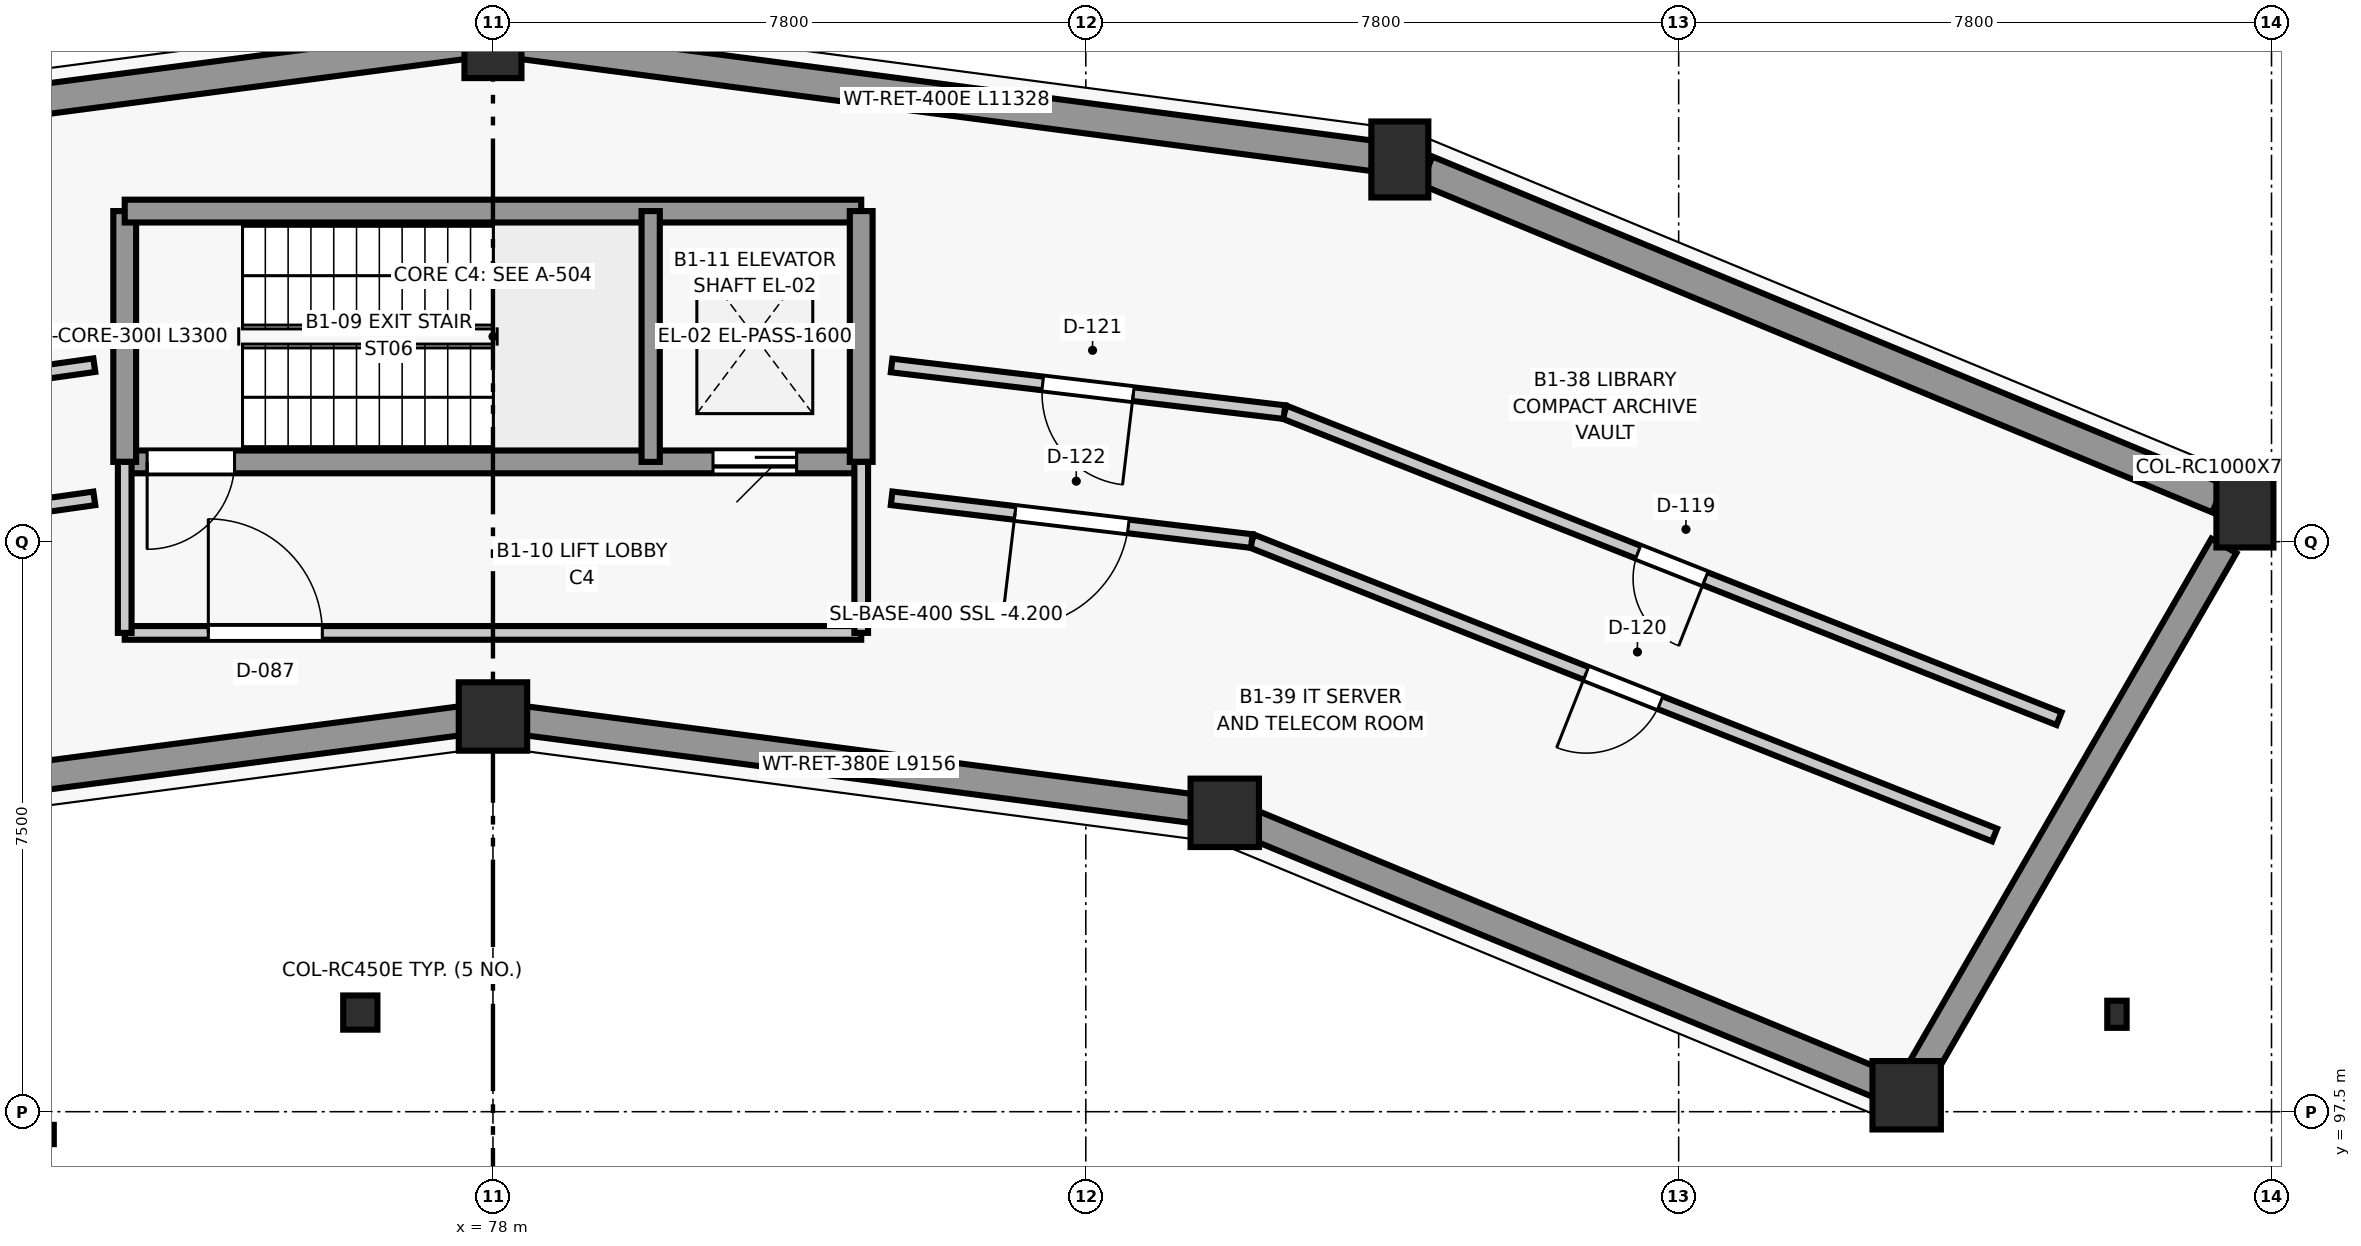
"""IFC4 building model, lengths in metres.
Left out: names, types, materials, properties, quantities, classifications, styles, units other than length and angle.
Written with IfcOpenShell. Run it as: python <this file> out.ifc"""

import sys

from ifc_helpers import new_model, si_unit, direction, frame, frame_2d, origin, origin_2d, place, context, subcontext, project, spatial, rectangle, hollow_rectangle, circle, i_section, extrude, element, fill, save


model = new_model("IFC4")
c1 = context("Model", 3, precision=1e-05, world=origin(), true_north=direction((0.0, 1.0)))
c2 = subcontext(c1, "Body", "Model", "MODEL_VIEW")
j1 = project(units=[si_unit("LENGTHUNIT", "METRE"), si_unit("PLANEANGLEUNIT", "RADIAN")], contexts=[c1])
p1 = place(None, origin())
s1 = spatial("IfcSite", under=j1, at=p1, CompositionType="ELEMENT")
p2 = place(p1, origin())
s2 = spatial("IfcBuilding", under=s1, at=p2, CompositionType="ELEMENT")
p3 = place(p2, frame((0.0, 0.0, -4.2)))
s3 = spatial("IfcBuildingStorey", under=s2, at=p3, CompositionType="ELEMENT", Elevation=-4.2)
for number, where, z_axis, x_axis in (
    (1, (96.6, 97.716, 0.0), (0.0, 0.0, 1.0), (1.0, 0.0, 0.0)),
    (2, (87.628, 101.432, 0.0), (0.0, 0.0, 1.0), (1.0, 0.0, 0.0)),
    (3, (78.0, 102.7, 0.0), (0.0, 0.0, 1.0), (1.0, 0.0, 0.0)),
):
    element("IfcColumn", number, at=place(p3, frame(where, z_axis=z_axis, x_axis=x_axis)), inside=s3, PredefinedType="COLUMN", context=c2, shape_type="SweptSolid", body=[
        extrude(circle(Radius=0.45, at=origin_2d()), origin(), (0.0, 0.0, 1.0), 4.2),
    ])
for number, where, z_axis, x_axis in (
    (4, (101.05, 105.424, 0.0), (0.0, 0.0, 1.0), (1.0, 0.0, 0.0)),
    (5, (89.932, 110.029, 0.0), (0.0, 0.0, 1.0), (1.0, 0.0, 0.0)),
    (6, (78.0, 111.6, 0.0), (0.0, 0.0, 1.0), (1.0, 0.0, 0.0)),
):
    element("IfcColumn", number, at=place(p3, frame(where, z_axis=z_axis, x_axis=x_axis)), inside=s3, PredefinedType="COLUMN", context=c2, shape_type="SweptSolid", body=[
        extrude(rectangle(XDim=0.75, YDim=1.0, at=origin_2d()), origin(), (0.0, 0.0, 1.0), 4.2),
    ])
p4 = place(p3, frame((99.366, 98.782, 0.0), z_axis=(0.0, 0.0, 1.0), x_axis=(1.0, 0.0, 0.0)))
e7 = element("IfcColumn", 7, at=p4, inside=s3, PredefinedType="COLUMN", context=c2, shape_type="SweptSolid", body=[
    extrude(i_section(OverallWidth=0.255, OverallDepth=0.357, WebThickness=0.01, FlangeThickness=0.018, FilletRadius=0.015, at=origin_2d()), origin(), (0.0, 0.0, 1.0), 4.2),
])
p5 = place(p3, frame((76.255, 98.804, 0.0), z_axis=(0.0, 0.0, 1.0), x_axis=(1.0, 0.0, 0.0)))
e8 = element("IfcColumn", 8, at=p5, inside=s3, PredefinedType="COLUMN", context=c2, shape_type="SweptSolid", body=[
    extrude(rectangle(XDim=0.45, YDim=0.45, at=origin_2d()), origin(), (0.0, 0.0, 1.0), 4.2),
])
p6 = place(p3, frame((90.283, 109.883, 0.0), z_axis=(0.0, 0.0, 1.0), x_axis=(0.923883530636, -0.382673779896, 0.0)))
e9 = element("IfcWall", 9, at=p6, inside=s3, PredefinedType="SHEAR", context=c2, shape_type="SweptSolid", body=[
    extrude(rectangle(XDim=11.272, YDim=0.4, at=frame_2d((5.636, 0.0))), origin(), (0.0, 0.0, 1.0), 3.92),
])
p7 = place(p3, frame((96.323, 97.831, 0.0), z_axis=(0.0, 0.0, 1.0), x_axis=(-0.923880324771, 0.382681519675, 0.0)))
e10 = element("IfcWall", 10, at=p7, inside=s3, PredefinedType="SHEAR", context=c2, shape_type="SweptSolid", body=[
    extrude(rectangle(XDim=9.112, YDim=0.38, at=frame_2d((4.556, 0.0))), origin(), (0.0, 0.0, 1.0), 3.92),
])
p8 = place(p3, frame((78.35, 111.554, 0.0), z_axis=(0.0, 0.0, 1.0), x_axis=(0.991443215359, -0.130538694334, 0.0)))
e11 = element("IfcWall", 11, at=p8, inside=s3, PredefinedType="SHEAR", context=c2, shape_type="SweptSolid", body=[
    extrude(rectangle(XDim=11.328, YDim=0.4, at=frame_2d((5.664, 0.0))), origin(), (0.0, 0.0, 1.0), 3.92),
])
p9 = place(p3, frame((87.353, 101.469, 0.0), z_axis=(0.0, 0.0, 1.0), x_axis=(-0.991441766434, 0.130549698469, 0.0)))
e12 = element("IfcWall", 12, at=p9, inside=s3, PredefinedType="SHEAR", context=c2, shape_type="SweptSolid", body=[
    extrude(rectangle(XDim=9.156, YDim=0.38, at=frame_2d((4.578, 0.0))), origin(), (0.0, 0.0, 1.0), 3.92),
])
p10 = place(p3, frame((66.419, 110.075, 0.0), z_axis=(0.0, 0.0, 1.0), x_axis=(0.991443215359, 0.130538694334, 0.0)))
e13 = element("IfcWall", 13, at=p10, inside=s3, PredefinedType="SHEAR", context=c2, shape_type="SweptSolid", body=[
    extrude(rectangle(XDim=11.328, YDim=0.4, at=frame_2d((5.664, 0.0))), origin(), (0.0, 0.0, 1.0), 3.92),
])
p11 = place(p3, frame((77.725, 102.664, 0.0), z_axis=(0.0, 0.0, 1.0), x_axis=(-0.991441766434, -0.130549698469, 0.0)))
e14 = element("IfcWall", 14, at=p11, inside=s3, PredefinedType="SHEAR", context=c2, shape_type="SweptSolid", body=[
    extrude(rectangle(XDim=9.156, YDim=0.38, at=frame_2d((4.578, 0.0))), origin(), (0.0, 0.0, 1.0), 3.92),
])
p12 = place(p3, frame((100.774, 104.946, 0.0), z_axis=(0.0, 0.0, 1.0), x_axis=(-0.499969958057, -0.866042747813, 0.0)))
e15 = element("IfcWall", 15, at=p12, inside=s3, PredefinedType="SHEAR", context=c2, shape_type="SweptSolid", body=[
    extrude(rectangle(XDim=8.026, YDim=0.38, at=frame_2d((4.013, 0.0))), origin(), (0.0, 0.0, 1.0), 3.92),
])
p13 = place(p3, frame((82.845, 106.05, 0.0), z_axis=(0.0, 0.0, 1.0), x_axis=(-1.0, 0.0, 0.0)))
e16 = element("IfcWall", 16, at=p13, inside=s3, PredefinedType="SHEAR", context=c2, shape_type="SweptSolid", body=[
    extrude(rectangle(XDim=9.69, YDim=0.3, at=frame_2d((4.845, 0.0))), origin(), (0.0, 0.0, 1.0), 4.2),
])
p14 = place(p13, frame((8.245, 0.0, 0.0)))
e17 = element("IfcOpeningElement", 17, at=p14, cuts=e16, PredefinedType="OPENING", context=c2, shape_type="SweptSolid", body=[
    extrude(rectangle(XDim=1.15, YDim=2.15, at=frame_2d((0.575, 1.075))), frame((0.0, 0.16, 0.0), z_axis=(0.0, -1.0, 0.0), x_axis=(1.0, 0.0, 0.0)), (0.0, 0.0, 1.0), 0.32),
])
p15 = place(p13, frame((0.85, 0.0, 0.0)))
e18 = element("IfcOpeningElement", 18, at=p15, cuts=e16, PredefinedType="OPENING", context=c2, shape_type="SweptSolid", body=[
    extrude(rectangle(XDim=1.1, YDim=2.15, at=frame_2d((0.55, 1.075))), frame((0.0, 0.16, 0.0), z_axis=(0.0, -1.0, 0.0), x_axis=(1.0, 0.0, 0.0)), (0.0, 0.0, 1.0), 0.32),
])
p16 = place(p3, frame((73.155, 106.05, 0.0), z_axis=(0.0, 0.0, 1.0), x_axis=(0.0, 1.0, 0.0)))
e19 = element("IfcWall", 19, at=p16, inside=s3, PredefinedType="SHEAR", context=c2, shape_type="SweptSolid", body=[
    extrude(rectangle(XDim=3.3, YDim=0.3, at=frame_2d((1.65, 0.0))), origin(), (0.0, 0.0, 1.0), 4.2),
])
p17 = place(p3, frame((73.155, 109.35, 0.0), z_axis=(0.0, 0.0, 1.0), x_axis=(1.0, 0.0, 0.0)))
e20 = element("IfcWall", 20, at=p17, inside=s3, PredefinedType="SHEAR", context=c2, shape_type="SweptSolid", body=[
    extrude(rectangle(XDim=9.69, YDim=0.3, at=frame_2d((4.845, 0.0))), origin(), (0.0, 0.0, 1.0), 4.2),
])
p18 = place(p3, frame((82.845, 109.35, 0.0), z_axis=(0.0, 0.0, 1.0), x_axis=(0.0, -1.0, 0.0)))
e21 = element("IfcWall", 21, at=p18, inside=s3, PredefinedType="SHEAR", context=c2, shape_type="SweptSolid", body=[
    extrude(rectangle(XDim=3.3, YDim=0.3, at=frame_2d((1.65, 0.0))), origin(), (0.0, 0.0, 1.0), 4.2),
])
p19 = place(p3, frame((80.075, 106.05, 0.0), z_axis=(0.0, 0.0, 1.0), x_axis=(0.0, 1.0, 0.0)))
e22 = element("IfcWall", 22, at=p19, inside=s3, PredefinedType="SHEAR", context=c2, shape_type="SweptSolid", body=[
    extrude(rectangle(XDim=3.3, YDim=0.24, at=frame_2d((1.65, 0.0))), origin(), (0.0, 0.0, 1.0), 4.2),
])
p20 = place(p3, frame((73.155, 103.8, 0.0), z_axis=(0.0, 0.0, 1.0), x_axis=(1.0, 0.0, 0.0)))
e23 = element("IfcWall", 23, at=p20, inside=s3, PredefinedType="PARTITIONING", context=c2, shape_type="SweptSolid", body=[
    extrude(rectangle(XDim=9.69, YDim=0.18, at=frame_2d((4.845, 0.0))), origin(), (0.0, 0.0, 1.0), 3.915),
])
p21 = place(p20, frame((1.1, 0.0, 0.0)))
e24 = element("IfcOpeningElement", 24, at=p21, cuts=e23, PredefinedType="OPENING", context=c2, shape_type="SweptSolid", body=[
    extrude(rectangle(XDim=1.5, YDim=2.15, at=frame_2d((0.75, 1.075))), frame((0.0, 0.1, 0.0), z_axis=(0.0, -1.0, 0.0), x_axis=(1.0, 0.0, 0.0)), (0.0, 0.0, 1.0), 0.2),
])
for number, where, z_axis, x_axis in (
    (25, (73.155, 106.05, 0.0), (0.0, 0.0, 1.0), (0.0, -1.0, 0.0)),
    (26, (82.845, 106.05, 0.0), (0.0, 0.0, 1.0), (0.0, -1.0, 0.0)),
):
    element("IfcWall", number, at=place(p3, frame(where, z_axis=z_axis, x_axis=x_axis)), inside=s3, PredefinedType="PARTITIONING", context=c2, shape_type="SweptSolid", body=[
        extrude(rectangle(XDim=2.25, YDim=0.18, at=frame_2d((1.125, 0.0))), origin(), (0.0, 0.0, 1.0), 3.915),
    ])
p22 = place(p3, frame((72.095, 97.2, 0.0), z_axis=(0.0, 0.0, 1.0), x_axis=(1.0, 0.0, 0.0)))
e27 = element("IfcColumn", 27, at=p22, inside=s3, PredefinedType="COLUMN", context=c2, shape_type="SweptSolid", body=[
    extrude(hollow_rectangle(XDim=0.254, YDim=0.254, WallThickness=0.012, InnerFilletRadius=0.012, OuterFilletRadius=0.024, at=origin_2d()), origin(), (0.0, 0.0, 1.0), 4.2),
])
p23 = place(p3, frame((98.604, 102.671, 0.0), z_axis=(0.0, 0.0, 1.0), x_axis=(-0.92984059227, 0.367962597238, 0.0)))
e28 = element("IfcWall", 28, at=p23, inside=s3, PredefinedType="PARTITIONING", context=c2, shape_type="SweptSolid", body=[
    extrude(rectangle(XDim=10.961, YDim=0.18, at=frame_2d((5.48, 0.0))), origin(), (0.0, 0.0, 1.0), 3.915),
])
p24 = place(p23, frame((5.006, 0.0, 0.0)))
e29 = element("IfcOpeningElement", 29, at=p24, cuts=e28, PredefinedType="OPENING", context=c2, shape_type="SweptSolid", body=[
    extrude(rectangle(XDim=0.95, YDim=2.1, at=frame_2d((0.475, 1.05))), frame((0.0, 0.1, 0.0), z_axis=(0.0, -1.0, 0.0), x_axis=(1.0, 0.0, 0.0)), (0.0, 0.0, 1.0), 0.2),
])
p25 = place(p3, frame((97.756, 101.141, 0.0), z_axis=(0.0, 0.0, 1.0), x_axis=(-0.92984171937, 0.367959749046, 0.0)))
e30 = element("IfcWall", 30, at=p25, inside=s3, PredefinedType="PARTITIONING", context=c2, shape_type="SweptSolid", body=[
    extrude(rectangle(XDim=10.51, YDim=0.18, at=frame_2d((5.255, 0.0))), origin(), (0.0, 0.0, 1.0), 3.915),
])
p26 = place(p25, frame((4.73, 0.0, 0.0)))
e31 = element("IfcOpeningElement", 31, at=p26, cuts=e30, PredefinedType="OPENING", context=c2, shape_type="SweptSolid", body=[
    extrude(rectangle(XDim=1.05, YDim=2.1, at=frame_2d((0.525, 1.05))), frame((0.0, 0.1, 0.0), z_axis=(0.0, -1.0, 0.0), x_axis=(1.0, 0.0, 0.0)), (0.0, 0.0, 1.0), 0.2),
])
p27 = place(p3, frame((88.413, 106.705, 0.0), z_axis=(0.0, 0.0, 1.0), x_axis=(-0.993019970185, 0.117946338706, 0.0)))
e32 = element("IfcWall", 32, at=p27, inside=s3, PredefinedType="PARTITIONING", context=c2, shape_type="SweptSolid", body=[
    extrude(rectangle(XDim=5.204, YDim=0.18, at=frame_2d((2.602, 0.0))), origin(), (0.0, 0.0, 1.0), 3.915),
])
p28 = place(p27, frame((2.002, 0.0, 0.0)))
e33 = element("IfcOpeningElement", 33, at=p28, cuts=e32, PredefinedType="OPENING", context=c2, shape_type="SweptSolid", body=[
    extrude(rectangle(XDim=1.2, YDim=2.15, at=frame_2d((0.6, 1.075))), frame((0.0, 0.1, 0.0), z_axis=(0.0, -1.0, 0.0), x_axis=(1.0, 0.0, 0.0)), (0.0, 0.0, 1.0), 0.2),
])
p29 = place(p3, frame((87.984, 105.008, 0.0), z_axis=(0.0, 0.0, 1.0), x_axis=(-0.993021837472, 0.117930616486, 0.0)))
e34 = element("IfcWall", 34, at=p29, inside=s3, PredefinedType="PARTITIONING", context=c2, shape_type="SweptSolid", body=[
    extrude(rectangle(XDim=4.772, YDim=0.18, at=frame_2d((2.386, 0.0))), origin(), (0.0, 0.0, 1.0), 3.915),
])
p30 = place(p29, frame((1.636, 0.0, 0.0)))
e35 = element("IfcOpeningElement", 35, at=p30, cuts=e34, PredefinedType="OPENING", context=c2, shape_type="SweptSolid", body=[
    extrude(rectangle(XDim=1.5, YDim=2.15, at=frame_2d((0.75, 1.075))), frame((0.0, 0.1, 0.0), z_axis=(0.0, -1.0, 0.0), x_axis=(1.0, 0.0, 0.0)), (0.0, 0.0, 1.0), 0.2),
])
p31 = place(p3, frame((72.755, 107.323, 0.0), z_axis=(0.0, 0.0, 1.0), x_axis=(-0.990158330555, -0.139951707499, 0.0)))
e36 = element("IfcWall", 36, at=p31, inside=s3, PredefinedType="PARTITIONING", context=c2, shape_type="SweptSolid", body=[
    extrude(rectangle(XDim=6.141, YDim=0.18, at=frame_2d((3.07, 0.0))), origin(), (0.0, 0.0, 1.0), 3.915),
])
p32 = place(p31, frame((2.345, 0.0, 0.0)))
e37 = element("IfcOpeningElement", 37, at=p32, cuts=e36, PredefinedType="OPENING", context=c2, shape_type="SweptSolid", body=[
    extrude(rectangle(XDim=1.45, YDim=2.2, at=frame_2d((0.725, 1.1))), frame((0.0, 0.1, 0.0), z_axis=(0.0, -1.0, 0.0), x_axis=(1.0, 0.0, 0.0)), (0.0, 0.0, 1.0), 0.2),
])
p33 = place(p3, frame((72.755, 105.57, 0.0), z_axis=(0.0, 0.0, 1.0), x_axis=(-0.990158541411, -0.13995021569, 0.0)))
e38 = element("IfcWall", 38, at=p33, inside=s3, PredefinedType="PARTITIONING", context=c2, shape_type="SweptSolid", body=[
    extrude(rectangle(XDim=5.67, YDim=0.18, at=frame_2d((2.835, 0.0))), origin(), (0.0, 0.0, 1.0), 3.915),
])
p34 = place(p33, frame((2.36, 0.0, 0.0)))
e39 = element("IfcOpeningElement", 39, at=p34, cuts=e38, PredefinedType="OPENING", context=c2, shape_type="SweptSolid", body=[
    extrude(rectangle(XDim=0.95, YDim=2.1, at=frame_2d((0.475, 1.05))), frame((0.0, 0.1, 0.0), z_axis=(0.0, -1.0, 0.0), x_axis=(1.0, 0.0, 0.0)), (0.0, 0.0, 1.0), 0.2),
])
p35 = place(p14, origin())
e40 = element("IfcDoor", 40, at=p35, inside=s3, OperationType="SINGLE_SWING_RIGHT", PredefinedType="DOOR", context=c2, shape_type="SweptSolid", body=[
    extrude(rectangle(XDim=1.15, YDim=2.15, at=frame_2d((0.575, 1.075))), frame((0.0, 0.025, 0.0), z_axis=(0.0, -1.0, 0.0), x_axis=(1.0, 0.0, 0.0)), (0.0, 0.0, 1.0), 0.05),
])
fill(e17, e40)
p36 = place(p15, origin())
e41 = element("IfcDoor", 41, at=p36, inside=s3, OperationType="SLIDING_TO_LEFT", PredefinedType="DOOR", context=c2, shape_type="SweptSolid", body=[
    extrude(rectangle(XDim=1.1, YDim=2.15, at=frame_2d((0.55, 1.075))), frame((0.0, 0.025, 0.0), z_axis=(0.0, -1.0, 0.0), x_axis=(1.0, 0.0, 0.0)), (0.0, 0.0, 1.0), 0.05),
])
fill(e18, e41)
p37 = place(p21, origin())
e42 = element("IfcDoor", 42, at=p37, inside=s3, OperationType="SINGLE_SWING_LEFT", PredefinedType="DOOR", context=c2, shape_type="SweptSolid", body=[
    extrude(rectangle(XDim=1.5, YDim=2.15, at=frame_2d((0.75, 1.075))), frame((0.0, 0.025, 0.0), z_axis=(0.0, -1.0, 0.0), x_axis=(1.0, 0.0, 0.0)), (0.0, 0.0, 1.0), 0.05),
])
fill(e24, e42)
p38 = place(p24, origin())
e43 = element("IfcDoor", 43, at=p38, inside=s3, OperationType="SINGLE_SWING_LEFT", PredefinedType="DOOR", context=c2, shape_type="SweptSolid", body=[
    extrude(rectangle(XDim=0.95, YDim=2.1, at=frame_2d((0.475, 1.05))), frame((0.0, 0.025, 0.0), z_axis=(0.0, -1.0, 0.0), x_axis=(1.0, 0.0, 0.0)), (0.0, 0.0, 1.0), 0.05),
])
fill(e29, e43)
p39 = place(p26, origin())
e44 = element("IfcDoor", 44, at=p39, inside=s3, OperationType="SINGLE_SWING_RIGHT", PredefinedType="DOOR", context=c2, shape_type="SweptSolid", body=[
    extrude(rectangle(XDim=1.05, YDim=2.1, at=frame_2d((0.525, 1.05))), frame((0.0, 0.025, 0.0), z_axis=(0.0, -1.0, 0.0), x_axis=(1.0, 0.0, 0.0)), (0.0, 0.0, 1.0), 0.05),
])
fill(e31, e44)
p40 = place(p28, origin())
e45 = element("IfcDoor", 45, at=p40, inside=s3, OperationType="SINGLE_SWING_LEFT", PredefinedType="DOOR", context=c2, shape_type="SweptSolid", body=[
    extrude(rectangle(XDim=1.2, YDim=2.15, at=frame_2d((0.6, 1.075))), frame((0.0, 0.025, 0.0), z_axis=(0.0, -1.0, 0.0), x_axis=(1.0, 0.0, 0.0)), (0.0, 0.0, 1.0), 0.05),
])
fill(e33, e45)
p41 = place(p30, origin())
e46 = element("IfcDoor", 46, at=p41, inside=s3, OperationType="SINGLE_SWING_RIGHT", PredefinedType="DOOR", context=c2, shape_type="SweptSolid", body=[
    extrude(rectangle(XDim=1.5, YDim=2.15, at=frame_2d((0.75, 1.075))), frame((0.0, 0.025, 0.0), z_axis=(0.0, -1.0, 0.0), x_axis=(1.0, 0.0, 0.0)), (0.0, 0.0, 1.0), 0.05),
])
fill(e35, e46)
save(model, sys.argv[1])
